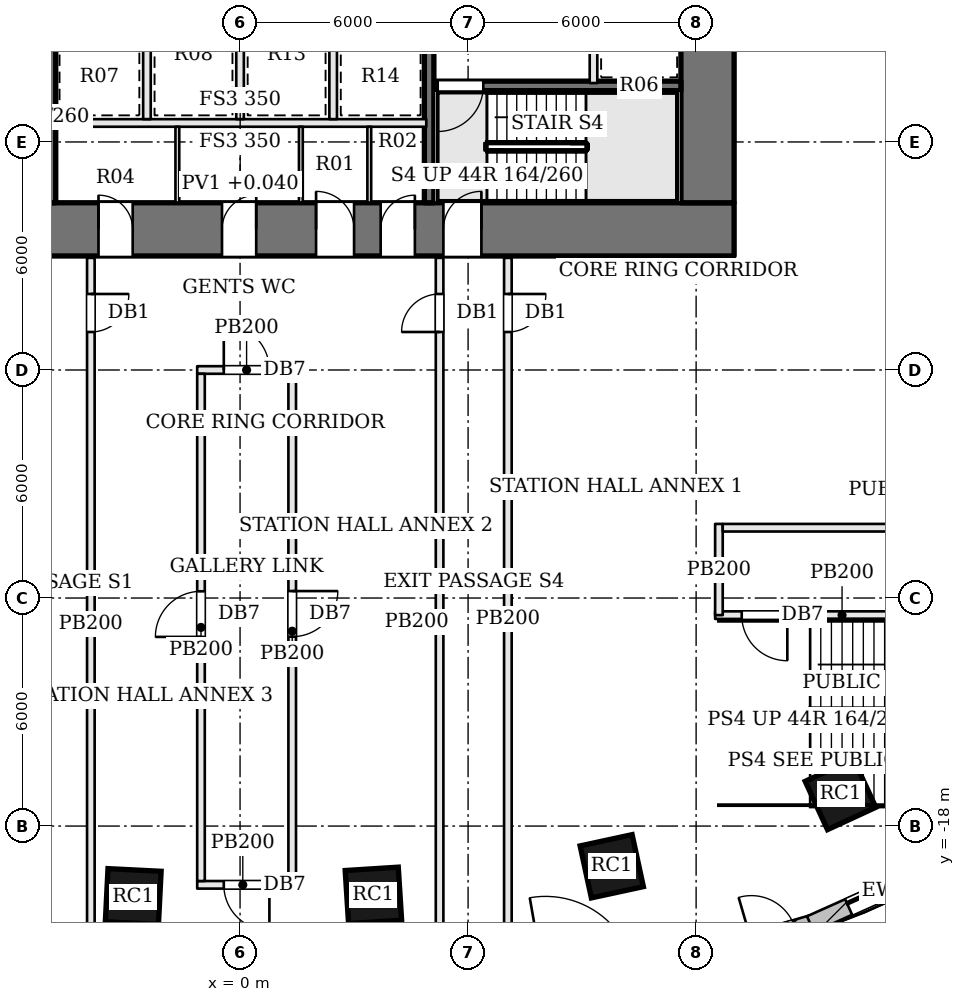
"""IFC4 building model, lengths in metres.
Left out: names, types, materials, properties, quantities, classifications, styles, units other than length and angle.
Written with IfcOpenShell. Run it as: python <this file> out.ifc"""

import sys

from ifc_helpers import new_model, si_unit, direction, frame, frame_2d, origin, origin_2d, place, context, subcontext, project, spatial, rectangle, extrude, element, fill, save


model = new_model("IFC4")
c1 = context("Model", 3, precision=1e-05, world=origin(), true_north=direction((0.0, 1.0)))
c2 = subcontext(c1, "Body", "Model", "MODEL_VIEW")
j1 = project(units=[si_unit("LENGTHUNIT", "METRE"), si_unit("PLANEANGLEUNIT", "RADIAN")], contexts=[c1])
p1 = place(None, origin())
s1 = spatial("IfcSite", under=j1, at=p1, CompositionType="ELEMENT")
p2 = place(p1, origin())
s2 = spatial("IfcBuilding", under=s1, at=p2, CompositionType="ELEMENT")
p3 = place(p2, origin())
s3 = spatial("IfcBuildingStorey", under=s2, at=p3, CompositionType="ELEMENT", Elevation=0.0)
p4 = place(p3, frame((-13.0, -2.3, 0.0), z_axis=(0.0, 0.0, 1.0), x_axis=(1.0, 0.0, 0.0)))
e1 = element("IfcWall", 1, at=p4, inside=s3, PredefinedType="SHEAR", context=c2, shape_type="SweptSolid", body=[
    extrude(rectangle(XDim=26.0, YDim=1.4, at=frame_2d((13.0, 0.0))), origin(), (0.0, 0.0, 1.0), 7.2),
])
p5 = place(p4, frame((9.275, 0.0, 0.0)))
e2 = element("IfcOpeningElement", 2, at=p5, cuts=e1, PredefinedType="OPENING", context=c2, shape_type="SweptSolid", body=[
    extrude(rectangle(XDim=0.9, YDim=2.1, at=frame_2d((0.45, 1.05))), frame((0.0, 0.71, 0.0), z_axis=(0.0, -1.0, 0.0), x_axis=(1.0, 0.0, 0.0)), (0.0, 0.0, 1.0), 1.42),
])
p6 = place(p4, frame((12.525, 0.0, 0.0)))
e3 = element("IfcOpeningElement", 3, at=p6, cuts=e1, PredefinedType="OPENING", context=c2, shape_type="SweptSolid", body=[
    extrude(rectangle(XDim=0.9, YDim=2.1, at=frame_2d((0.45, 1.05))), frame((0.0, 0.71, 0.0), z_axis=(0.0, -1.0, 0.0), x_axis=(1.0, 0.0, 0.0)), (0.0, 0.0, 1.0), 1.42),
])
p7 = place(p4, frame((15.0, 0.0, 0.0)))
e4 = element("IfcOpeningElement", 4, at=p7, cuts=e1, PredefinedType="OPENING", context=c2, shape_type="SweptSolid", body=[
    extrude(rectangle(XDim=1.0, YDim=2.1, at=frame_2d((0.5, 1.05))), frame((0.0, 0.71, 0.0), z_axis=(0.0, -1.0, 0.0), x_axis=(1.0, 0.0, 0.0)), (0.0, 0.0, 1.0), 1.42),
])
p8 = place(p4, frame((16.7, 0.0, 0.0)))
e5 = element("IfcOpeningElement", 5, at=p8, cuts=e1, PredefinedType="OPENING", context=c2, shape_type="SweptSolid", body=[
    extrude(rectangle(XDim=0.9, YDim=2.1, at=frame_2d((0.45, 1.05))), frame((0.0, 0.71, 0.0), z_axis=(0.0, -1.0, 0.0), x_axis=(1.0, 0.0, 0.0)), (0.0, 0.0, 1.0), 1.42),
])
p9 = place(p4, frame((6.65, 0.0, 0.0)))
e6 = element("IfcOpeningElement", 6, at=p9, cuts=e1, PredefinedType="OPENING", context=c2, shape_type="SweptSolid", body=[
    extrude(rectangle(XDim=1.0, YDim=2.1, at=frame_2d((0.5, 1.05))), frame((0.0, 0.71, 0.0), z_axis=(0.0, -1.0, 0.0), x_axis=(1.0, 0.0, 0.0)), (0.0, 0.0, 1.0), 1.42),
])
p10 = place(p4, frame((18.35, 0.0, 0.0)))
e7 = element("IfcOpeningElement", 7, at=p10, cuts=e1, PredefinedType="OPENING", context=c2, shape_type="SweptSolid", body=[
    extrude(rectangle(XDim=1.0, YDim=2.1, at=frame_2d((0.5, 1.05))), frame((0.0, 0.71, 0.0), z_axis=(0.0, -1.0, 0.0), x_axis=(1.0, 0.0, 0.0)), (0.0, 0.0, 1.0), 1.42),
])
p11 = place(p3, frame((12.3, -1.6, 0.0), z_axis=(0.0, 0.0, 1.0), x_axis=(0.0, 1.0, 0.0)))
e8 = element("IfcWall", 8, at=p11, inside=s3, PredefinedType="SHEAR", context=c2, shape_type="SweptSolid", body=[
    extrude(rectangle(XDim=12.2, YDim=1.4, at=frame_2d((6.1, 0.0))), origin(), (0.0, 0.0, 1.0), 7.2),
])
p12 = place(p11, frame((6.8, 0.0, 0.0)))
e9 = element("IfcOpeningElement", 9, at=p12, cuts=e8, PredefinedType="OPENING", context=c2, shape_type="SweptSolid", body=[
    extrude(rectangle(XDim=1.8, YDim=2.1, at=frame_2d((0.9, 1.05))), frame((0.0, 0.71, 0.0), z_axis=(0.0, -1.0, 0.0), x_axis=(1.0, 0.0, 0.0)), (0.0, 0.0, 1.0), 1.42),
])
for number, where, z_axis, x_axis in (
    (10, (-2.811, -19.854, 0.0), (0.0, 0.0, 1.0), (0.999, -0.05, 0.0)),
    (11, (3.509, -19.824, 0.0), (0.0, 0.0, 1.0), (0.998, 0.063, 0.0)),
    (12, (9.78, -19.058, 0.0), (0.0, 0.0, 1.0), (0.977, 0.211, 0.0)),
    (13, (15.799, -17.165, 0.0), (0.0, 0.0, 1.0), (0.908, 0.419, 0.0)),
):
    element("IfcColumn", number, at=place(p3, frame(where, z_axis=z_axis, x_axis=x_axis)), inside=s3, PredefinedType="COLUMN", context=c2, shape_type="SweptSolid", body=[
        extrude(rectangle(XDim=1.4, YDim=1.4, at=origin_2d()), origin(), (0.0, 0.0, 1.0), 7.2),
    ])
p13 = place(p3, frame((11.11, -21.712, 0.0), z_axis=(0.0, 0.0, 1.0), x_axis=(0.960186274122, 0.279360553743, 0.0)))
e14 = element("IfcWall", 14, at=p13, inside=s3, PredefinedType="SOLIDWALL", context=c2, shape_type="SweptSolid", body=[
    extrude(rectangle(XDim=4.091, YDim=0.45, at=frame_2d((2.045, 0.0))), origin(), (0.0, 0.0, 1.0), 6.95),
])
p14 = place(p13, frame((0.45, 0.0, 0.9)))
e15 = element("IfcOpeningElement", 15, at=p14, cuts=e14, PredefinedType="OPENING", context=c2, shape_type="SweptSolid", body=[
    extrude(rectangle(XDim=2.1, YDim=5.0, at=frame_2d((1.05, 2.5))), frame((0.0, 0.235, 0.0), z_axis=(0.0, -1.0, 0.0), x_axis=(1.0, 0.0, 0.0)), (0.0, 0.0, 1.0), 0.47),
])
p15 = place(p13, frame((2.441, 0.0, 0.0)))
e16 = element("IfcOpeningElement", 16, at=p15, cuts=e14, PredefinedType="OPENING", context=c2, shape_type="SweptSolid", body=[
    extrude(rectangle(XDim=1.2, YDim=2.4, at=frame_2d((0.6, 1.2))), frame((0.0, 0.235, 0.0), z_axis=(0.0, -1.0, 0.0), x_axis=(1.0, 0.0, 0.0)), (0.0, 0.0, 1.0), 0.47),
])
p16 = place(p3, frame((15.009, -20.58, 0.0), z_axis=(0.0, 0.0, 1.0), x_axis=(0.912571415594, 0.408917365052, 0.0)))
e17 = element("IfcWall", 17, at=p16, inside=s3, PredefinedType="SOLIDWALL", context=c2, shape_type="SweptSolid", body=[
    extrude(rectangle(XDim=4.301, YDim=0.45, at=frame_2d((2.15, 0.0))), origin(), (0.0, 0.0, 1.0), 6.95),
])
p17 = place(p16, frame((1.101, 0.0, 0.9)))
e18 = element("IfcOpeningElement", 18, at=p17, cuts=e17, PredefinedType="OPENING", context=c2, shape_type="SweptSolid", body=[
    extrude(rectangle(XDim=2.1, YDim=5.0, at=frame_2d((1.05, 2.5))), frame((0.0, 0.235, 0.0), z_axis=(0.0, -1.0, 0.0), x_axis=(1.0, 0.0, 0.0)), (0.0, 0.0, 1.0), 0.47),
])
p18 = place(p3, frame((11.6, 1.475, 0.0), z_axis=(0.0, 0.0, 1.0), x_axis=(-1.0, 0.0, 0.0)))
e19 = element("IfcWall", 19, at=p18, inside=s3, PredefinedType="SOLIDWALL", context=c2, shape_type="SweptSolid", body=[
    extrude(rectangle(XDim=6.5, YDim=0.25, at=frame_2d((3.25, 0.0))), origin(), (0.0, 0.0, 1.0), 6.95),
])
p19 = place(p18, frame((5.2, 0.0, 0.0)))
e20 = element("IfcOpeningElement", 20, at=p19, cuts=e19, PredefinedType="OPENING", context=c2, shape_type="SweptSolid", body=[
    extrude(rectangle(XDim=1.2, YDim=2.1, at=frame_2d((0.6, 1.05))), frame((0.0, 0.135, 0.0), z_axis=(0.0, -1.0, 0.0), x_axis=(1.0, 0.0, 0.0)), (0.0, 0.0, 1.0), 0.27),
])
p20 = place(p3, frame((9.3, 4.55, 0.0), z_axis=(0.0, 0.0, 1.0), x_axis=(0.0, -1.0, 0.0)))
e21 = element("IfcWall", 21, at=p20, inside=s3, PredefinedType="SOLIDWALL", context=c2, shape_type="SweptSolid", body=[
    extrude(rectangle(XDim=3.0, YDim=0.2, at=frame_2d((1.5, 0.0))), origin(), (0.0, 0.0, 1.0), 6.95),
])
p21 = place(p3, frame((-4.975, -1.6, 0.0), z_axis=(0.0, 0.0, 1.0), x_axis=(0.0, 1.0, 0.0)))
e22 = element("IfcWall", 22, at=p21, inside=s3, PredefinedType="SOLIDWALL", context=c2, shape_type="SweptSolid", body=[
    extrude(rectangle(XDim=12.2, YDim=0.25, at=frame_2d((6.1, 0.0))), origin(), (0.0, 0.0, 1.0), 6.95),
])
p22 = place(p21, frame((4.65, 0.0, 0.0)))
e23 = element("IfcOpeningElement", 23, at=p22, cuts=e22, PredefinedType="OPENING", context=c2, shape_type="SweptSolid", body=[
    extrude(rectangle(XDim=1.2, YDim=2.1, at=frame_2d((0.6, 1.05))), frame((0.0, 0.135, 0.0), z_axis=(0.0, -1.0, 0.0), x_axis=(1.0, 0.0, 0.0)), (0.0, 0.0, 1.0), 0.27),
])
p23 = place(p3, frame((4.975, 10.6, 0.0), z_axis=(0.0, 0.0, 1.0), x_axis=(0.0, -1.0, 0.0)))
e24 = element("IfcWall", 24, at=p23, inside=s3, PredefinedType="SOLIDWALL", context=c2, shape_type="SweptSolid", body=[
    extrude(rectangle(XDim=12.2, YDim=0.25, at=frame_2d((6.1, 0.0))), origin(), (0.0, 0.0, 1.0), 6.95),
])
p24 = place(p23, frame((4.65, 0.0, 0.0)))
e25 = element("IfcOpeningElement", 25, at=p24, cuts=e24, PredefinedType="OPENING", context=c2, shape_type="SweptSolid", body=[
    extrude(rectangle(XDim=1.2, YDim=2.1, at=frame_2d((0.6, 1.05))), frame((0.0, 0.135, 0.0), z_axis=(0.0, -1.0, 0.0), x_axis=(1.0, 0.0, 0.0)), (0.0, 0.0, 1.0), 0.27),
])
p25 = place(p3, frame((-4.9, 0.5, 0.0), z_axis=(0.0, 0.0, 1.0), x_axis=(1.0, 0.0, 0.0)))
e26 = element("IfcWall", 26, at=p25, inside=s3, PredefinedType="SOLIDWALL", context=c2, shape_type="SweptSolid", body=[
    extrude(rectangle(XDim=9.8, YDim=0.2, at=frame_2d((4.9, 0.0))), origin(), (0.0, 0.0, 1.0), 6.95),
])
for number, where, z_axis, x_axis in (
    (27, (-2.45, 0.6, 0.0), (0.0, 0.0, 1.0), (0.0, 1.0, 0.0)),
    (28, (0.0, 0.6, 0.0), (0.0, 0.0, 1.0), (0.0, 1.0, 0.0)),
    (29, (2.45, 0.6, 0.0), (0.0, 0.0, 1.0), (0.0, 1.0, 0.0)),
):
    element("IfcWall", number, at=place(p3, frame(where, z_axis=z_axis, x_axis=x_axis)), inside=s3, PredefinedType="SOLIDWALL", context=c2, shape_type="SweptSolid", body=[
        extrude(rectangle(XDim=2.2, YDim=0.2, at=frame_2d((1.1, 0.0))), origin(), (0.0, 0.0, 1.0), 6.95),
    ])
for number, where, z_axis, x_axis in (
    (30, (-1.65, -1.6, 0.0), (0.0, 0.0, 1.0), (0.0, 1.0, 0.0)),
    (31, (1.6, -1.6, 0.0), (0.0, 0.0, 1.0), (0.0, 1.0, 0.0)),
    (32, (3.4, -1.6, 0.0), (0.0, 0.0, 1.0), (0.0, 1.0, 0.0)),
):
    element("IfcWall", number, at=place(p3, frame(where, z_axis=z_axis, x_axis=x_axis)), inside=s3, PredefinedType="PARTITIONING", context=c2, shape_type="SweptSolid", body=[
        extrude(rectangle(XDim=2.0, YDim=0.1, at=frame_2d((1.0, 0.0))), origin(), (0.0, 0.0, 1.0), 6.95),
    ])
p26 = place(p3, frame((-3.926, -3.05, 0.0), z_axis=(0.0, 0.0, 1.0), x_axis=(0.0, -1.0, 0.0)))
e33 = element("IfcWall", 33, at=p26, inside=s3, PredefinedType="PARTITIONING", context=c2, shape_type="SweptSolid", body=[
    extrude(rectangle(XDim=19.252, YDim=0.2, at=frame_2d((9.626, 0.0))), origin(), (0.0, 0.0, 1.0), 6.23),
])
p27 = place(p26, frame((0.95, 0.0, 0.0)))
e34 = element("IfcOpeningElement", 34, at=p27, cuts=e33, PredefinedType="OPENING", context=c2, shape_type="SweptSolid", body=[
    extrude(rectangle(XDim=1.0, YDim=2.1, at=frame_2d((0.5, 1.05))), frame((0.0, 0.11, 0.0), z_axis=(0.0, -1.0, 0.0), x_axis=(1.0, 0.0, 0.0)), (0.0, 0.0, 1.0), 0.22),
])
p28 = place(p3, frame((7.047, -3.05, 0.0), z_axis=(0.0, 0.0, 1.0), x_axis=(0.0, -1.0, 0.0)))
e35 = element("IfcWall", 35, at=p28, inside=s3, PredefinedType="PARTITIONING", context=c2, shape_type="SweptSolid", body=[
    extrude(rectangle(XDim=18.98, YDim=0.2, at=frame_2d((9.49, 0.0))), origin(), (0.0, 0.0, 1.0), 6.23),
])
p29 = place(p28, frame((0.95, 0.0, 0.0)))
e36 = element("IfcOpeningElement", 36, at=p29, cuts=e35, PredefinedType="OPENING", context=c2, shape_type="SweptSolid", body=[
    extrude(rectangle(XDim=1.0, YDim=2.1, at=frame_2d((0.5, 1.05))), frame((0.0, 0.11, 0.0), z_axis=(0.0, -1.0, 0.0), x_axis=(1.0, 0.0, 0.0)), (0.0, 0.0, 1.0), 0.22),
])
p30 = place(p3, frame((5.25, -22.21, 0.0), z_axis=(0.0, 0.0, 1.0), x_axis=(0.0, 1.0, 0.0)))
e37 = element("IfcWall", 37, at=p30, inside=s3, PredefinedType="PARTITIONING", context=c2, shape_type="SweptSolid", body=[
    extrude(rectangle(XDim=19.16, YDim=0.2, at=frame_2d((9.58, 0.0))), origin(), (0.0, 0.0, 1.0), 6.23),
])
p31 = place(p30, frame((17.21, 0.0, 0.0)))
e38 = element("IfcOpeningElement", 38, at=p31, cuts=e37, PredefinedType="OPENING", context=c2, shape_type="SweptSolid", body=[
    extrude(rectangle(XDim=1.0, YDim=2.1, at=frame_2d((0.5, 1.05))), frame((0.0, 0.11, 0.0), z_axis=(0.0, -1.0, 0.0), x_axis=(1.0, 0.0, 0.0)), (0.0, 0.0, 1.0), 0.22),
])
p32 = place(p3, frame((19.18, -12.45, 0.0), z_axis=(0.0, 0.0, 1.0), x_axis=(-1.0, 0.0, 0.0)))
e39 = element("IfcWall", 39, at=p32, inside=s3, PredefinedType="PARTITIONING", context=c2, shape_type="SweptSolid", body=[
    extrude(rectangle(XDim=6.68, YDim=0.2, at=frame_2d((3.34, 0.0))), origin(), (0.0, 0.0, 1.0), 6.23),
])
p33 = place(p32, frame((4.78, 0.0, 0.0)))
e40 = element("IfcOpeningElement", 40, at=p33, cuts=e39, PredefinedType="OPENING", context=c2, shape_type="SweptSolid", body=[
    extrude(rectangle(XDim=1.2, YDim=2.1, at=frame_2d((0.6, 1.05))), frame((0.0, 0.11, 0.0), z_axis=(0.0, -1.0, 0.0), x_axis=(1.0, 0.0, 0.0)), (0.0, 0.0, 1.0), 0.22),
])
p34 = place(p3, frame((12.6, -12.45, 0.0), z_axis=(0.0, 0.0, 1.0), x_axis=(0.0, 1.0, 0.0)))
e41 = element("IfcWall", 41, at=p34, inside=s3, PredefinedType="PARTITIONING", context=c2, shape_type="SweptSolid", body=[
    extrude(rectangle(XDim=2.4, YDim=0.2, at=frame_2d((1.2, 0.0))), origin(), (0.0, 0.0, 1.0), 6.23),
])
p35 = place(p3, frame((12.7, -10.15, 0.0), z_axis=(0.0, 0.0, 1.0), x_axis=(1.0, 0.0, 0.0)))
e42 = element("IfcWall", 42, at=p35, inside=s3, PredefinedType="PARTITIONING", context=c2, shape_type="SweptSolid", body=[
    extrude(rectangle(XDim=13.257, YDim=0.2, at=frame_2d((6.628, 0.0))), origin(), (0.0, 0.0, 1.0), 6.23),
])
p36 = place(p3, frame((-1.128, -6.0, 0.0), z_axis=(0.0, 0.0, 1.0), x_axis=(1.0, 0.0, 0.0)))
e43 = element("IfcWall", 43, at=p36, inside=s3, PredefinedType="PARTITIONING", context=c2, shape_type="SweptSolid", body=[
    extrude(rectangle(XDim=2.6, YDim=0.2, at=frame_2d((1.3, 0.0))), origin(), (0.0, 0.0, 1.0), 6.23),
])
p37 = place(p36, frame((0.7, 0.0, 0.0)))
e44 = element("IfcOpeningElement", 44, at=p37, cuts=e43, PredefinedType="OPENING", context=c2, shape_type="SweptSolid", body=[
    extrude(rectangle(XDim=1.2, YDim=2.1, at=frame_2d((0.6, 1.05))), frame((0.0, 0.11, 0.0), z_axis=(0.0, -1.0, 0.0), x_axis=(1.0, 0.0, 0.0)), (0.0, 0.0, 1.0), 0.22),
])
p38 = place(p3, frame((1.372, -6.1, 0.0), z_axis=(0.0, 0.0, 1.0), x_axis=(0.0, -1.0, 0.0)))
e45 = element("IfcWall", 45, at=p38, inside=s3, PredefinedType="PARTITIONING", context=c2, shape_type="SweptSolid", body=[
    extrude(rectangle(XDim=13.546, YDim=0.2, at=frame_2d((6.773, 0.0))), origin(), (0.0, 0.0, 1.0), 6.23),
])
p39 = place(p38, frame((5.717, 0.0, 0.0)))
e46 = element("IfcOpeningElement", 46, at=p39, cuts=e45, PredefinedType="OPENING", context=c2, shape_type="SweptSolid", body=[
    extrude(rectangle(XDim=1.2, YDim=2.1, at=frame_2d((0.6, 1.05))), frame((0.0, 0.11, 0.0), z_axis=(0.0, -1.0, 0.0), x_axis=(1.0, 0.0, 0.0)), (0.0, 0.0, 1.0), 0.22),
])
p40 = place(p3, frame((1.272, -19.546, 0.0), z_axis=(0.0, 0.0, 1.0), x_axis=(-1.0, 0.0, 0.0)))
e47 = element("IfcWall", 47, at=p40, inside=s3, PredefinedType="PARTITIONING", context=c2, shape_type="SweptSolid", body=[
    extrude(rectangle(XDim=2.4, YDim=0.2, at=frame_2d((1.2, 0.0))), origin(), (0.0, 0.0, 1.0), 6.23),
])
p41 = place(p40, frame((0.5, 0.0, 0.0)))
e48 = element("IfcOpeningElement", 48, at=p41, cuts=e47, PredefinedType="OPENING", context=c2, shape_type="SweptSolid", body=[
    extrude(rectangle(XDim=1.2, YDim=2.1, at=frame_2d((0.6, 1.05))), frame((0.0, 0.11, 0.0), z_axis=(0.0, -1.0, 0.0), x_axis=(1.0, 0.0, 0.0)), (0.0, 0.0, 1.0), 0.22),
])
p42 = place(p3, frame((-1.028, -19.446, 0.0), z_axis=(0.0, 0.0, 1.0), x_axis=(0.0, 1.0, 0.0)))
e49 = element("IfcWall", 49, at=p42, inside=s3, PredefinedType="PARTITIONING", context=c2, shape_type="SweptSolid", body=[
    extrude(rectangle(XDim=13.346, YDim=0.2, at=frame_2d((6.673, 0.0))), origin(), (0.0, 0.0, 1.0), 6.23),
])
p43 = place(p42, frame((6.423, 0.0, 0.0)))
e50 = element("IfcOpeningElement", 50, at=p43, cuts=e49, PredefinedType="OPENING", context=c2, shape_type="SweptSolid", body=[
    extrude(rectangle(XDim=1.2, YDim=2.1, at=frame_2d((0.6, 1.05))), frame((0.0, 0.11, 0.0), z_axis=(0.0, -1.0, 0.0), x_axis=(1.0, 0.0, 0.0)), (0.0, 0.0, 1.0), 0.22),
])
p44 = place(p17, origin())
e51 = element("IfcWindow", 51, at=p44, inside=s3, PartitioningType="SINGLE_PANEL", PredefinedType="WINDOW", context=c2, shape_type="SweptSolid", body=[
    extrude(rectangle(XDim=2.1, YDim=5.0, at=frame_2d((1.05, 2.5))), frame((0.0, 0.135, 0.0), z_axis=(0.0, -1.0, 0.0), x_axis=(1.0, 0.0, 0.0)), (0.0, 0.0, 1.0), 0.06),
])
fill(e18, e51)
p45 = place(p19, origin())
e52 = element("IfcDoor", 52, at=p45, inside=s3, OperationType="SINGLE_SWING_RIGHT", PredefinedType="DOOR", context=c2, shape_type="SweptSolid", body=[
    extrude(rectangle(XDim=1.2, YDim=2.1, at=frame_2d((0.6, 1.05))), frame((0.0, 0.025, 0.0), z_axis=(0.0, -1.0, 0.0), x_axis=(1.0, 0.0, 0.0)), (0.0, 0.0, 1.0), 0.05),
])
fill(e20, e52)
p46 = place(p5, origin())
e53 = element("IfcDoor", 53, at=p46, inside=s3, OperationType="SINGLE_SWING_LEFT", PredefinedType="DOOR", context=c2, shape_type="SweptSolid", body=[
    extrude(rectangle(XDim=0.9, YDim=2.1, at=frame_2d((0.45, 1.05))), frame((0.0, 0.025, 0.0), z_axis=(0.0, -1.0, 0.0), x_axis=(1.0, 0.0, 0.0)), (0.0, 0.0, 1.0), 0.05),
])
fill(e2, e53)
p47 = place(p6, origin())
e54 = element("IfcDoor", 54, at=p47, inside=s3, OperationType="SINGLE_SWING_RIGHT", PredefinedType="DOOR", context=c2, shape_type="SweptSolid", body=[
    extrude(rectangle(XDim=0.9, YDim=2.1, at=frame_2d((0.45, 1.05))), frame((0.0, 0.025, 0.0), z_axis=(0.0, -1.0, 0.0), x_axis=(1.0, 0.0, 0.0)), (0.0, 0.0, 1.0), 0.05),
])
fill(e3, e54)
p48 = place(p7, origin())
e55 = element("IfcDoor", 55, at=p48, inside=s3, OperationType="SINGLE_SWING_LEFT", PredefinedType="DOOR", context=c2, shape_type="SweptSolid", body=[
    extrude(rectangle(XDim=1.0, YDim=2.1, at=frame_2d((0.5, 1.05))), frame((0.0, 0.025, 0.0), z_axis=(0.0, -1.0, 0.0), x_axis=(1.0, 0.0, 0.0)), (0.0, 0.0, 1.0), 0.05),
])
fill(e4, e55)
p49 = place(p8, origin())
e56 = element("IfcDoor", 56, at=p49, inside=s3, OperationType="SINGLE_SWING_RIGHT", PredefinedType="DOOR", context=c2, shape_type="SweptSolid", body=[
    extrude(rectangle(XDim=0.9, YDim=2.1, at=frame_2d((0.45, 1.05))), frame((0.0, 0.025, 0.0), z_axis=(0.0, -1.0, 0.0), x_axis=(1.0, 0.0, 0.0)), (0.0, 0.0, 1.0), 0.05),
])
fill(e5, e56)
p50 = place(p10, origin())
e57 = element("IfcDoor", 57, at=p50, inside=s3, OperationType="SINGLE_SWING_RIGHT", PredefinedType="DOOR", context=c2, shape_type="SweptSolid", body=[
    extrude(rectangle(XDim=1.0, YDim=2.1, at=frame_2d((0.5, 1.05))), frame((0.0, 0.025, 0.0), z_axis=(0.0, -1.0, 0.0), x_axis=(1.0, 0.0, 0.0)), (0.0, 0.0, 1.0), 0.05),
])
fill(e7, e57)
p51 = place(p27, origin())
e58 = element("IfcDoor", 58, at=p51, inside=s3, OperationType="SINGLE_SWING_LEFT", PredefinedType="DOOR", context=c2, shape_type="SweptSolid", body=[
    extrude(rectangle(XDim=1.0, YDim=2.1, at=frame_2d((0.5, 1.05))), frame((0.0, 0.025, 0.0), z_axis=(0.0, -1.0, 0.0), x_axis=(1.0, 0.0, 0.0)), (0.0, 0.0, 1.0), 0.05),
])
fill(e34, e58)
p52 = place(p29, origin())
e59 = element("IfcDoor", 59, at=p52, inside=s3, OperationType="SINGLE_SWING_LEFT", PredefinedType="DOOR", context=c2, shape_type="SweptSolid", body=[
    extrude(rectangle(XDim=1.0, YDim=2.1, at=frame_2d((0.5, 1.05))), frame((0.0, 0.025, 0.0), z_axis=(0.0, -1.0, 0.0), x_axis=(1.0, 0.0, 0.0)), (0.0, 0.0, 1.0), 0.05),
])
fill(e36, e59)
p53 = place(p31, origin())
e60 = element("IfcDoor", 60, at=p53, inside=s3, OperationType="SINGLE_SWING_LEFT", PredefinedType="DOOR", context=c2, shape_type="SweptSolid", body=[
    extrude(rectangle(XDim=1.0, YDim=2.1, at=frame_2d((0.5, 1.05))), frame((0.0, 0.025, 0.0), z_axis=(0.0, -1.0, 0.0), x_axis=(1.0, 0.0, 0.0)), (0.0, 0.0, 1.0), 0.05),
])
fill(e38, e60)
p54 = place(p37, origin())
e61 = element("IfcDoor", 61, at=p54, inside=s3, OperationType="SINGLE_SWING_LEFT", PredefinedType="DOOR", context=c2, shape_type="SweptSolid", body=[
    extrude(rectangle(XDim=1.2, YDim=2.1, at=frame_2d((0.6, 1.05))), frame((0.0, 0.025, 0.0), z_axis=(0.0, -1.0, 0.0), x_axis=(1.0, 0.0, 0.0)), (0.0, 0.0, 1.0), 0.05),
])
fill(e44, e61)
p55 = place(p41, origin())
e62 = element("IfcDoor", 62, at=p55, inside=s3, OperationType="SINGLE_SWING_LEFT", PredefinedType="DOOR", context=c2, shape_type="SweptSolid", body=[
    extrude(rectangle(XDim=1.2, YDim=2.1, at=frame_2d((0.6, 1.05))), frame((0.0, 0.025, 0.0), z_axis=(0.0, -1.0, 0.0), x_axis=(1.0, 0.0, 0.0)), (0.0, 0.0, 1.0), 0.05),
])
fill(e48, e62)
p56 = place(p33, origin())
e63 = element("IfcDoor", 63, at=p56, inside=s3, OperationType="SINGLE_SWING_LEFT", PredefinedType="DOOR", context=c2, shape_type="SweptSolid", body=[
    extrude(rectangle(XDim=1.2, YDim=2.1, at=frame_2d((0.6, 1.05))), frame((0.0, 0.025, 0.0), z_axis=(0.0, -1.0, 0.0), x_axis=(1.0, 0.0, 0.0)), (0.0, 0.0, 1.0), 0.05),
])
fill(e40, e63)
p57 = place(p39, origin())
e64 = element("IfcDoor", 64, at=p57, inside=s3, OperationType="SINGLE_SWING_LEFT", PredefinedType="DOOR", context=c2, shape_type="SweptSolid", body=[
    extrude(rectangle(XDim=1.2, YDim=2.1, at=frame_2d((0.6, 1.05))), frame((0.0, 0.025, 0.0), z_axis=(0.0, -1.0, 0.0), x_axis=(1.0, 0.0, 0.0)), (0.0, 0.0, 1.0), 0.05),
])
fill(e46, e64)
p58 = place(p43, origin())
e65 = element("IfcDoor", 65, at=p58, inside=s3, OperationType="SINGLE_SWING_LEFT", PredefinedType="DOOR", context=c2, shape_type="SweptSolid", body=[
    extrude(rectangle(XDim=1.2, YDim=2.1, at=frame_2d((0.6, 1.05))), frame((0.0, 0.025, 0.0), z_axis=(0.0, -1.0, 0.0), x_axis=(1.0, 0.0, 0.0)), (0.0, 0.0, 1.0), 0.05),
])
fill(e50, e65)
save(model, sys.argv[1])
